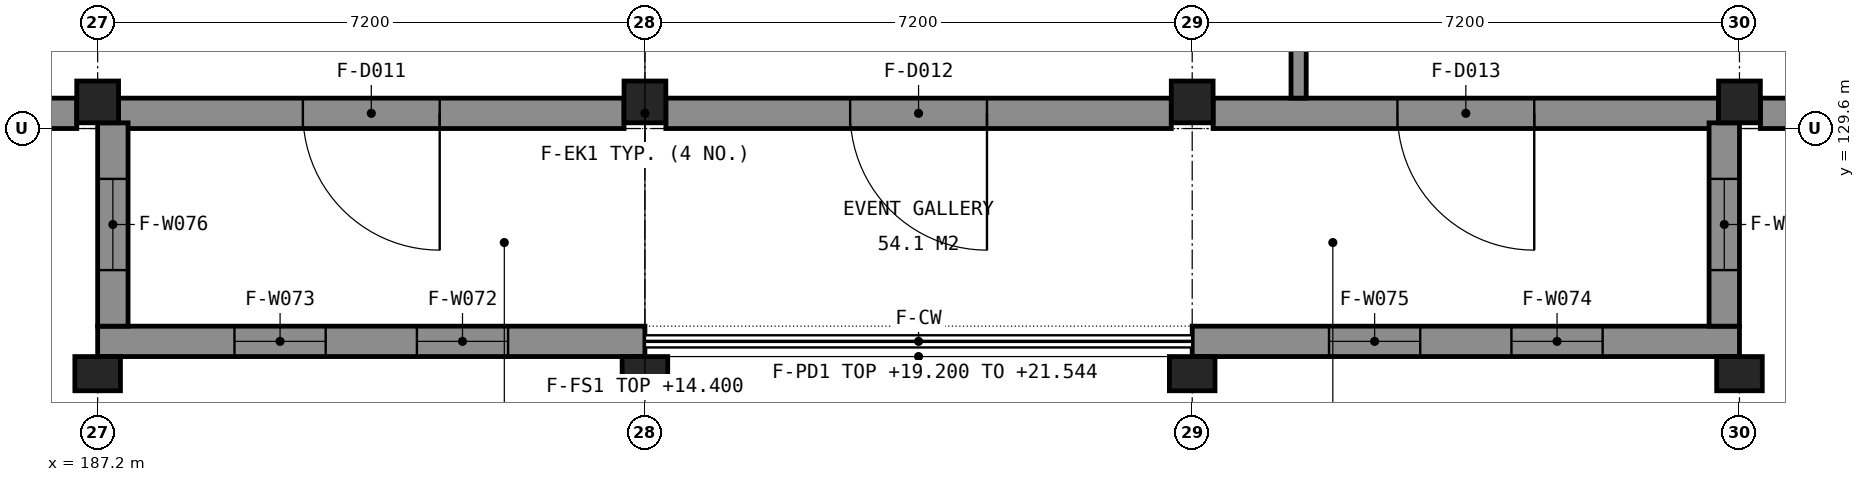
"""IFC4 building model, lengths in metres.
Left out: names, types, materials, properties, quantities, classifications, styles, units other than length and angle.
Written with IfcOpenShell. Run it as: python <this file> out.ifc"""

import sys

from ifc_helpers import new_model, si_unit, direction, frame, frame_2d, origin, origin_2d, place, context, subcontext, project, spatial, rectangle, extrude, element, fill, save


model = new_model("IFC4")
c1 = context("Model", 3, precision=1e-05, world=origin(), true_north=direction((0.0, 1.0)))
c2 = subcontext(c1, "Body", "Model", "MODEL_VIEW")
j1 = project(units=[si_unit("LENGTHUNIT", "METRE"), si_unit("PLANEANGLEUNIT", "RADIAN")], contexts=[c1])
p1 = place(None, origin())
s1 = spatial("IfcSite", under=j1, at=p1, CompositionType="ELEMENT")
p2 = place(p1, origin())
s2 = spatial("IfcBuilding", under=s1, at=p2, CompositionType="ELEMENT")
p3 = place(p2, frame((0.0, 0.0, 14.4)))
s3 = spatial("IfcBuildingStorey", under=s2, at=p3, CompositionType="ELEMENT", Elevation=14.4)
for number, where, z_axis, x_axis in (
    (1, (187.2, 129.95, 0.0), (0.0, 0.0, 1.0), (1.0, 0.0, 0.0)),
    (2, (194.4, 129.95, 0.0), (0.0, 0.0, 1.0), (1.0, 0.0, 0.0)),
    (3, (201.6, 129.95, 0.0), (0.0, 0.0, 1.0), (1.0, 0.0, 0.0)),
    (4, (208.8, 129.95, 0.0), (0.0, 0.0, 1.0), (1.0, 0.0, 0.0)),
):
    element("IfcColumn", number, at=place(p3, frame(where, z_axis=z_axis, x_axis=x_axis)), inside=s3, PredefinedType="COLUMN", context=c2, shape_type="SweptSolid", body=[
        extrude(rectangle(XDim=0.55, YDim=0.55, at=origin_2d()), origin(), (0.0, 0.0, 1.0), 4.8),
    ])
p4 = place(p3, frame((186.925, 129.8, 0.0), z_axis=(0.0, 0.0, 1.0), x_axis=(-1.0, 0.0, 0.0)))
e5 = element("IfcWall", 5, at=p4, inside=s3, PredefinedType="SOLIDWALL", context=c2, shape_type="SweptSolid", body=[
    extrude(rectangle(XDim=6.65, YDim=0.4, at=frame_2d((3.325, 0.0))), origin(), (0.0, 0.0, 1.0), 3.95),
])
p5 = place(p4, frame((1.525, 0.0, 1.8)))
e6 = element("IfcOpeningElement", 6, at=p5, cuts=e5, PredefinedType="OPENING", context=c2, shape_type="SweptSolid", body=[
    extrude(rectangle(XDim=1.2, YDim=1.2, at=frame_2d((0.6, 0.6))), frame((0.0, 0.21, 0.0), z_axis=(0.0, -1.0, 0.0), x_axis=(1.0, 0.0, 0.0)), (0.0, 0.0, 1.0), 0.42),
])
p6 = place(p4, frame((3.925, 0.0, 1.8)))
e7 = element("IfcOpeningElement", 7, at=p6, cuts=e5, PredefinedType="OPENING", context=c2, shape_type="SweptSolid", body=[
    extrude(rectangle(XDim=1.2, YDim=1.2, at=frame_2d((0.6, 0.6))), frame((0.0, 0.21, 0.0), z_axis=(0.0, -1.0, 0.0), x_axis=(1.0, 0.0, 0.0)), (0.0, 0.0, 1.0), 0.42),
])
p7 = place(p3, frame((194.125, 129.8, 0.0), z_axis=(0.0, 0.0, 1.0), x_axis=(-1.0, 0.0, 0.0)))
e8 = element("IfcWall", 8, at=p7, inside=s3, PredefinedType="SOLIDWALL", context=c2, shape_type="SweptSolid", body=[
    extrude(rectangle(XDim=6.65, YDim=0.4, at=frame_2d((3.325, 0.0))), origin(), (0.0, 0.0, 1.0), 3.95),
])
p8 = place(p7, frame((2.425, 0.0, 0.0)))
e9 = element("IfcOpeningElement", 9, at=p8, cuts=e8, PredefinedType="OPENING", context=c2, shape_type="SweptSolid", body=[
    extrude(rectangle(XDim=1.8, YDim=2.1, at=frame_2d((0.9, 1.05))), frame((0.0, 0.21, 0.0), z_axis=(0.0, -1.0, 0.0), x_axis=(1.0, 0.0, 0.0)), (0.0, 0.0, 1.0), 0.42),
])
p9 = place(p3, frame((201.325, 129.8, 0.0), z_axis=(0.0, 0.0, 1.0), x_axis=(-1.0, 0.0, 0.0)))
e10 = element("IfcWall", 10, at=p9, inside=s3, PredefinedType="SOLIDWALL", context=c2, shape_type="SweptSolid", body=[
    extrude(rectangle(XDim=6.65, YDim=0.4, at=frame_2d((3.325, 0.0))), origin(), (0.0, 0.0, 1.0), 3.95),
])
p10 = place(p9, frame((2.425, 0.0, 0.0)))
e11 = element("IfcOpeningElement", 11, at=p10, cuts=e10, PredefinedType="OPENING", context=c2, shape_type="SweptSolid", body=[
    extrude(rectangle(XDim=1.8, YDim=2.1, at=frame_2d((0.9, 1.05))), frame((0.0, 0.21, 0.0), z_axis=(0.0, -1.0, 0.0), x_axis=(1.0, 0.0, 0.0)), (0.0, 0.0, 1.0), 0.42),
])
p11 = place(p3, frame((208.525, 129.8, 0.0), z_axis=(0.0, 0.0, 1.0), x_axis=(-1.0, 0.0, 0.0)))
e12 = element("IfcWall", 12, at=p11, inside=s3, PredefinedType="SOLIDWALL", context=c2, shape_type="SweptSolid", body=[
    extrude(rectangle(XDim=6.65, YDim=0.4, at=frame_2d((3.325, 0.0))), origin(), (0.0, 0.0, 1.0), 3.95),
])
p12 = place(p11, frame((2.425, 0.0, 0.0)))
e13 = element("IfcOpeningElement", 13, at=p12, cuts=e12, PredefinedType="OPENING", context=c2, shape_type="SweptSolid", body=[
    extrude(rectangle(XDim=1.8, YDim=2.1, at=frame_2d((0.9, 1.05))), frame((0.0, 0.21, 0.0), z_axis=(0.0, -1.0, 0.0), x_axis=(1.0, 0.0, 0.0)), (0.0, 0.0, 1.0), 0.42),
])
p13 = place(p3, frame((215.725, 129.8, 0.0), z_axis=(0.0, 0.0, 1.0), x_axis=(-1.0, 0.0, 0.0)))
e14 = element("IfcWall", 14, at=p13, inside=s3, PredefinedType="SOLIDWALL", context=c2, shape_type="SweptSolid", body=[
    extrude(rectangle(XDim=6.65, YDim=0.4, at=frame_2d((3.325, 0.0))), origin(), (0.0, 0.0, 1.0), 3.95),
])
p14 = place(p13, frame((1.525, 0.0, 1.8)))
e15 = element("IfcOpeningElement", 15, at=p14, cuts=e14, PredefinedType="OPENING", context=c2, shape_type="SweptSolid", body=[
    extrude(rectangle(XDim=1.2, YDim=1.2, at=frame_2d((0.6, 0.6))), frame((0.0, 0.21, 0.0), z_axis=(0.0, -1.0, 0.0), x_axis=(1.0, 0.0, 0.0)), (0.0, 0.0, 1.0), 0.42),
])
p15 = place(p13, frame((3.925, 0.0, 1.8)))
e16 = element("IfcOpeningElement", 16, at=p15, cuts=e14, PredefinedType="OPENING", context=c2, shape_type="SweptSolid", body=[
    extrude(rectangle(XDim=1.2, YDim=1.2, at=frame_2d((0.6, 0.6))), frame((0.0, 0.21, 0.0), z_axis=(0.0, -1.0, 0.0), x_axis=(1.0, 0.0, 0.0)), (0.0, 0.0, 1.0), 0.42),
])
p16 = place(p3, frame((230.4, 129.8, 4.8), z_axis=(0.0, 0.0, 1.0), x_axis=(-1.0, 0.0, 0.0)))
e17 = element("IfcWall", 17, at=p16, inside=s3, PredefinedType="SOLIDWALL", context=c2, shape_type="SweptSolid", body=[
    extrude(rectangle(XDim=72.0, YDim=0.4, at=frame_2d((36.0, 0.0))), origin(), (0.0, 0.0, 1.0), 0.45),
])
p17 = place(p3, frame((186.6, 129.1, 4.5), z_axis=(0.0, 0.0, 1.0), x_axis=(-1.0, 0.0, 0.0)))
e18 = element("IfcWall", 18, at=p17, inside=s3, PredefinedType="SOLIDWALL", context=c2, shape_type="SweptSolid", body=[
    extrude(rectangle(XDim=28.8, YDim=0.2, at=frame_2d((14.4, 0.0))), origin(), (0.0, 0.0, 1.0), 0.45),
])
p18 = place(p3, frame((194.4, 126.8, 0.0), z_axis=(0.0, 0.0, 1.0), x_axis=(-1.0, 0.0, 0.0)))
e19 = element("IfcWall", 19, at=p18, inside=s3, PredefinedType="SOLIDWALL", context=c2, shape_type="SweptSolid", body=[
    extrude(rectangle(XDim=7.2, YDim=0.4, at=frame_2d((3.6, 0.0))), origin(), (0.0, 0.0, 1.0), 4.55),
])
p19 = place(p18, frame((1.8, 0.0, 1.8)))
e20 = element("IfcOpeningElement", 20, at=p19, cuts=e19, PredefinedType="OPENING", context=c2, shape_type="SweptSolid", body=[
    extrude(rectangle(XDim=1.2, YDim=1.2, at=frame_2d((0.6, 0.6))), frame((0.0, 0.21, 0.0), z_axis=(0.0, -1.0, 0.0), x_axis=(1.0, 0.0, 0.0)), (0.0, 0.0, 1.0), 0.42),
])
p20 = place(p18, frame((4.2, 0.0, 1.8)))
e21 = element("IfcOpeningElement", 21, at=p20, cuts=e19, PredefinedType="OPENING", context=c2, shape_type="SweptSolid", body=[
    extrude(rectangle(XDim=1.2, YDim=1.2, at=frame_2d((0.6, 0.6))), frame((0.0, 0.21, 0.0), z_axis=(0.0, -1.0, 0.0), x_axis=(1.0, 0.0, 0.0)), (0.0, 0.0, 1.0), 0.42),
])
p21 = place(p3, frame((208.8, 126.8, 0.0), z_axis=(0.0, 0.0, 1.0), x_axis=(-1.0, 0.0, 0.0)))
e22 = element("IfcWall", 22, at=p21, inside=s3, PredefinedType="SOLIDWALL", context=c2, shape_type="SweptSolid", body=[
    extrude(rectangle(XDim=7.2, YDim=0.4, at=frame_2d((3.6, 0.0))), origin(), (0.0, 0.0, 1.0), 4.55),
])
p22 = place(p21, frame((1.8, 0.0, 1.8)))
e23 = element("IfcOpeningElement", 23, at=p22, cuts=e22, PredefinedType="OPENING", context=c2, shape_type="SweptSolid", body=[
    extrude(rectangle(XDim=1.2, YDim=1.2, at=frame_2d((0.6, 0.6))), frame((0.0, 0.21, 0.0), z_axis=(0.0, -1.0, 0.0), x_axis=(1.0, 0.0, 0.0)), (0.0, 0.0, 1.0), 0.42),
])
p23 = place(p21, frame((4.2, 0.0, 1.8)))
e24 = element("IfcOpeningElement", 24, at=p23, cuts=e22, PredefinedType="OPENING", context=c2, shape_type="SweptSolid", body=[
    extrude(rectangle(XDim=1.2, YDim=1.2, at=frame_2d((0.6, 0.6))), frame((0.0, 0.21, 0.0), z_axis=(0.0, -1.0, 0.0), x_axis=(1.0, 0.0, 0.0)), (0.0, 0.0, 1.0), 0.42),
])
p24 = place(p3, frame((187.4, 127.0, 0.0), z_axis=(0.0, 0.0, 1.0), x_axis=(0.0, 1.0, 0.0)))
e25 = element("IfcWall", 25, at=p24, inside=s3, PredefinedType="SOLIDWALL", context=c2, shape_type="SweptSolid", body=[
    extrude(rectangle(XDim=2.675, YDim=0.4, at=frame_2d((1.337, 0.0))), origin(), (0.0, 0.0, 1.0), 4.55),
])
p25 = place(p24, frame((0.738, 0.0, 1.8)))
e26 = element("IfcOpeningElement", 26, at=p25, cuts=e25, PredefinedType="OPENING", context=c2, shape_type="SweptSolid", body=[
    extrude(rectangle(XDim=1.2, YDim=1.2, at=frame_2d((0.6, 0.6))), frame((0.0, 0.21, 0.0), z_axis=(0.0, -1.0, 0.0), x_axis=(1.0, 0.0, 0.0)), (0.0, 0.0, 1.0), 0.42),
])
p26 = place(p3, frame((208.6, 129.675, 0.0), z_axis=(0.0, 0.0, 1.0), x_axis=(0.0, -1.0, 0.0)))
e27 = element("IfcWall", 27, at=p26, inside=s3, PredefinedType="SOLIDWALL", context=c2, shape_type="SweptSolid", body=[
    extrude(rectangle(XDim=2.675, YDim=0.4, at=frame_2d((1.337, 0.0))), origin(), (0.0, 0.0, 1.0), 4.55),
])
p27 = place(p26, frame((0.738, 0.0, 1.8)))
e28 = element("IfcOpeningElement", 28, at=p27, cuts=e27, PredefinedType="OPENING", context=c2, shape_type="SweptSolid", body=[
    extrude(rectangle(XDim=1.2, YDim=1.2, at=frame_2d((0.6, 0.6))), frame((0.0, 0.21, 0.0), z_axis=(0.0, -1.0, 0.0), x_axis=(1.0, 0.0, 0.0)), (0.0, 0.0, 1.0), 0.42),
])
for number, where, z_axis, x_axis in (
    (29, (187.2, 126.375, 0.0), (0.0, 0.0, 1.0), (1.0, 0.0, 0.0)),
    (30, (194.4, 126.375, 0.0), (0.0, 0.0, 1.0), (1.0, 0.0, 0.0)),
    (31, (201.6, 126.375, 0.0), (0.0, 0.0, 1.0), (1.0, 0.0, 0.0)),
    (32, (208.8, 126.375, 0.0), (0.0, 0.0, 1.0), (1.0, 0.0, 0.0)),
):
    element("IfcColumn", number, at=place(p3, frame(where, z_axis=z_axis, x_axis=x_axis)), inside=s3, PredefinedType="PILASTER", context=c2, shape_type="SweptSolid", body=[
        extrude(rectangle(XDim=0.6, YDim=0.45, at=origin_2d()), origin(), (0.0, 0.0, 1.0), 4.05),
    ])
p28 = place(p3, frame((203.0, 130.0, 0.0), z_axis=(0.0, 0.0, 1.0), x_axis=(0.0, 1.0, 0.0)))
e33 = element("IfcWall", 33, at=p28, inside=s3, PredefinedType="PARTITIONING", context=c2, shape_type="SweptSolid", body=[
    extrude(rectangle(XDim=11.2, YDim=0.2, at=frame_2d((5.6, 0.0))), origin(), (0.0, 0.0, 1.0), 3.95),
])
p29 = place(p8, origin())
e34 = element("IfcDoor", 34, at=p29, inside=s3, OperationType="NOTDEFINED", PredefinedType="DOOR", context=c2, shape_type="SweptSolid", body=[
    extrude(rectangle(XDim=1.8, YDim=2.1, at=frame_2d((0.9, 1.05))), frame((0.0, 0.025, 0.0), z_axis=(0.0, -1.0, 0.0), x_axis=(1.0, 0.0, 0.0)), (0.0, 0.0, 1.0), 0.05),
])
fill(e9, e34)
p30 = place(p10, origin())
e35 = element("IfcDoor", 35, at=p30, inside=s3, OperationType="NOTDEFINED", PredefinedType="DOOR", context=c2, shape_type="SweptSolid", body=[
    extrude(rectangle(XDim=1.8, YDim=2.1, at=frame_2d((0.9, 1.05))), frame((0.0, 0.025, 0.0), z_axis=(0.0, -1.0, 0.0), x_axis=(1.0, 0.0, 0.0)), (0.0, 0.0, 1.0), 0.05),
])
fill(e11, e35)
p31 = place(p12, origin())
e36 = element("IfcDoor", 36, at=p31, inside=s3, OperationType="NOTDEFINED", PredefinedType="DOOR", context=c2, shape_type="SweptSolid", body=[
    extrude(rectangle(XDim=1.8, YDim=2.1, at=frame_2d((0.9, 1.05))), frame((0.0, 0.025, 0.0), z_axis=(0.0, -1.0, 0.0), x_axis=(1.0, 0.0, 0.0)), (0.0, 0.0, 1.0), 0.05),
])
fill(e13, e36)
p32 = place(p19, origin())
e37 = element("IfcWindow", 37, at=p32, inside=s3, PartitioningType="SINGLE_PANEL", PredefinedType="WINDOW", context=c2, shape_type="SweptSolid", body=[
    extrude(rectangle(XDim=1.2, YDim=1.2, at=frame_2d((0.6, 0.6))), frame((0.0, -0.09, 0.0), z_axis=(0.0, -1.0, 0.0), x_axis=(1.0, 0.0, 0.0)), (0.0, 0.0, 1.0), 0.06),
])
fill(e20, e37)
p33 = place(p20, origin())
e38 = element("IfcWindow", 38, at=p33, inside=s3, PartitioningType="SINGLE_PANEL", PredefinedType="WINDOW", context=c2, shape_type="SweptSolid", body=[
    extrude(rectangle(XDim=1.2, YDim=1.2, at=frame_2d((0.6, 0.6))), frame((0.0, -0.09, 0.0), z_axis=(0.0, -1.0, 0.0), x_axis=(1.0, 0.0, 0.0)), (0.0, 0.0, 1.0), 0.06),
])
fill(e21, e38)
p34 = place(p22, origin())
e39 = element("IfcWindow", 39, at=p34, inside=s3, PartitioningType="SINGLE_PANEL", PredefinedType="WINDOW", context=c2, shape_type="SweptSolid", body=[
    extrude(rectangle(XDim=1.2, YDim=1.2, at=frame_2d((0.6, 0.6))), frame((0.0, -0.09, 0.0), z_axis=(0.0, -1.0, 0.0), x_axis=(1.0, 0.0, 0.0)), (0.0, 0.0, 1.0), 0.06),
])
fill(e23, e39)
p35 = place(p23, origin())
e40 = element("IfcWindow", 40, at=p35, inside=s3, PartitioningType="SINGLE_PANEL", PredefinedType="WINDOW", context=c2, shape_type="SweptSolid", body=[
    extrude(rectangle(XDim=1.2, YDim=1.2, at=frame_2d((0.6, 0.6))), frame((0.0, -0.09, 0.0), z_axis=(0.0, -1.0, 0.0), x_axis=(1.0, 0.0, 0.0)), (0.0, 0.0, 1.0), 0.06),
])
fill(e24, e40)
p36 = place(p25, origin())
e41 = element("IfcWindow", 41, at=p36, inside=s3, PartitioningType="SINGLE_PANEL", PredefinedType="WINDOW", context=c2, shape_type="SweptSolid", body=[
    extrude(rectangle(XDim=1.2, YDim=1.2, at=frame_2d((0.6, 0.6))), frame((0.0, -0.09, 0.0), z_axis=(0.0, -1.0, 0.0), x_axis=(1.0, 0.0, 0.0)), (0.0, 0.0, 1.0), 0.06),
])
fill(e26, e41)
p37 = place(p27, origin())
e42 = element("IfcWindow", 42, at=p37, inside=s3, PartitioningType="SINGLE_PANEL", PredefinedType="WINDOW", context=c2, shape_type="SweptSolid", body=[
    extrude(rectangle(XDim=1.2, YDim=1.2, at=frame_2d((0.6, 0.6))), frame((0.0, -0.09, 0.0), z_axis=(0.0, -1.0, 0.0), x_axis=(1.0, 0.0, 0.0)), (0.0, 0.0, 1.0), 0.06),
])
fill(e28, e42)
save(model, sys.argv[1])
